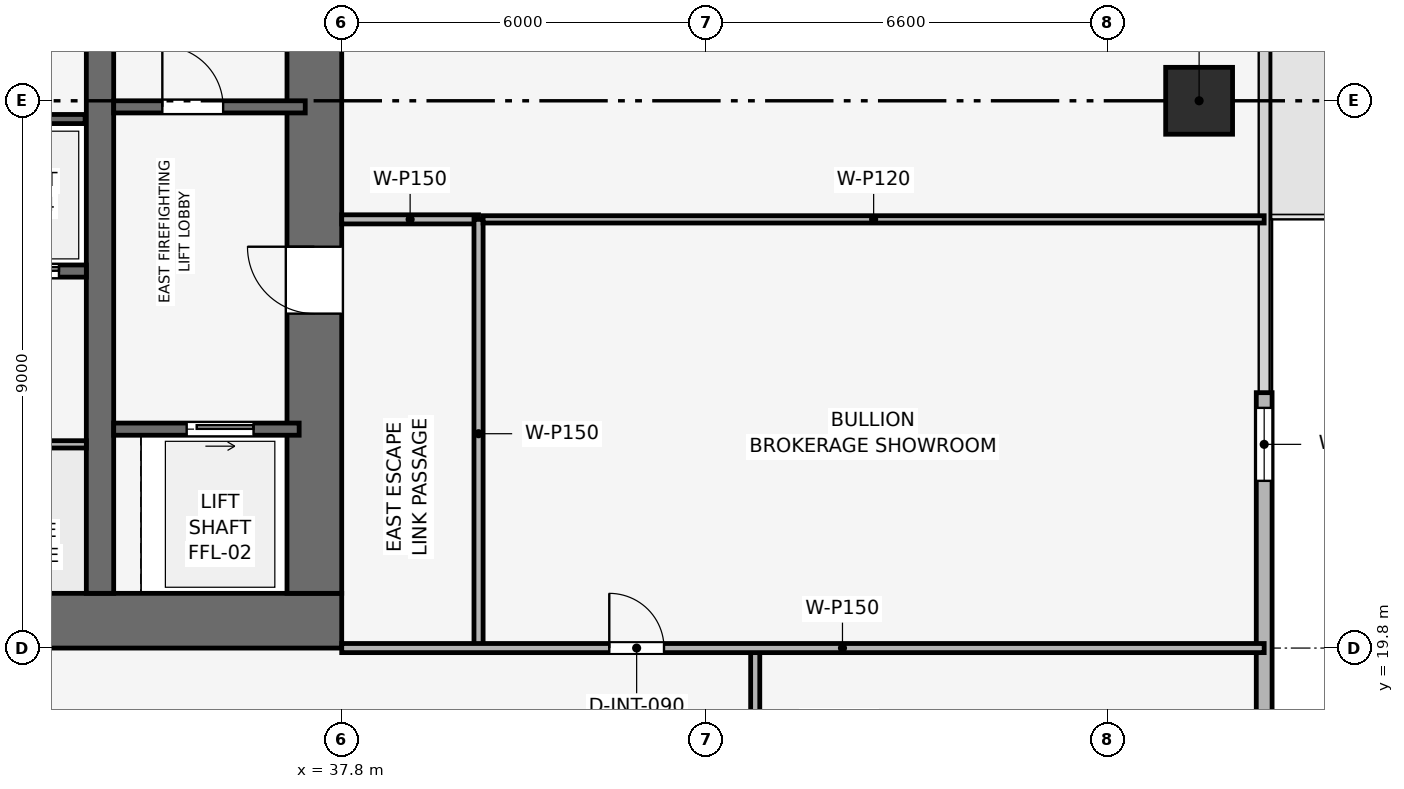
"""IFC4 building model, lengths in metres.
Left out: names, types, materials, properties, quantities, classifications, styles, units other than length and angle.
Written with IfcOpenShell. Run it as: python <this file> out.ifc"""

import sys

from ifc_helpers import new_model, si_unit, direction, frame, frame_2d, origin, origin_2d, place, context, subcontext, project, spatial, rectangle, extrude, element, fill, save


model = new_model("IFC4")
c1 = context("Model", 3, precision=1e-05, world=origin(), true_north=direction((0.0, 1.0)))
c2 = subcontext(c1, "Body", "Model", "MODEL_VIEW")
j1 = project(units=[si_unit("LENGTHUNIT", "METRE"), si_unit("PLANEANGLEUNIT", "RADIAN")], contexts=[c1])
p1 = place(None, origin())
s1 = spatial("IfcSite", under=j1, at=p1, CompositionType="ELEMENT")
p2 = place(p1, origin())
s2 = spatial("IfcBuilding", under=s1, at=p2, CompositionType="ELEMENT")
p3 = place(p2, frame((0.0, 0.0, 164.55)))
s3 = spatial("IfcBuildingStorey", under=s2, at=p3, CompositionType="ELEMENT", Elevation=164.55)
p4 = place(p3, frame((19.8, 20.25, 0.0), z_axis=(0.0, 0.0, 1.0), x_axis=(1.0, 0.0, 0.0)))
e1 = element("IfcWall", 1, at=p4, inside=s3, PredefinedType="SHEAR", context=c2, shape_type="SweptSolid", body=[
    extrude(rectangle(XDim=18.0, YDim=0.9, at=frame_2d((9.0, 0.0))), origin(), (0.0, 0.0, 1.0), 3.75),
])
p5 = place(p4, frame((8.4, 0.0, 0.0)))
e2 = element("IfcOpeningElement", 2, at=p5, cuts=e1, PredefinedType="OPENING", context=c2, shape_type="SweptSolid", body=[
    extrude(rectangle(XDim=1.2, YDim=2.2, at=frame_2d((0.6, 1.1))), frame((0.0, 0.46, 0.0), z_axis=(0.0, -1.0, 0.0), x_axis=(1.0, 0.0, 0.0)), (0.0, 0.0, 1.0), 0.92),
])
p6 = place(p3, frame((37.35, 20.7, 0.0), z_axis=(0.0, 0.0, 1.0), x_axis=(0.0, 1.0, 0.0)))
e3 = element("IfcWall", 3, at=p6, inside=s3, PredefinedType="SHEAR", context=c2, shape_type="SweptSolid", body=[
    extrude(rectangle(XDim=16.2, YDim=0.9, at=frame_2d((8.1, 0.0))), origin(), (0.0, 0.0, 1.0), 3.75),
])
p7 = place(p6, frame((4.6, 0.0, 0.0)))
e4 = element("IfcOpeningElement", 4, at=p7, cuts=e3, PredefinedType="OPENING", context=c2, shape_type="SweptSolid", body=[
    extrude(rectangle(XDim=1.1, YDim=2.15, at=frame_2d((0.55, 1.075))), frame((0.0, 0.46, 0.0), z_axis=(0.0, -1.0, 0.0), x_axis=(1.0, 0.0, 0.0)), (0.0, 0.0, 1.0), 0.92),
])
p8 = place(p3, frame((33.825, 20.7, 0.0), z_axis=(0.0, 0.0, 1.0), x_axis=(0.0, 1.0, 0.0)))
e5 = element("IfcWall", 5, at=p8, inside=s3, PredefinedType="SHEAR", context=c2, shape_type="SweptSolid", body=[
    extrude(rectangle(XDim=16.2, YDim=0.45, at=frame_2d((8.1, 0.0))), origin(), (0.0, 0.0, 1.0), 3.75),
])
p9 = place(p3, frame((51.9, 28.8, 0.003), z_axis=(0.0, 0.0, 1.0), x_axis=(1.0, 0.0, 0.0)))
e6 = element("IfcColumn", 6, at=p9, inside=s3, PredefinedType="COLUMN", context=c2, shape_type="SweptSolid", body=[
    extrude(rectangle(XDim=1.1, YDim=1.1, at=origin_2d()), origin(), (0.0, 0.0, 1.0), 3.489),
])
p10 = place(p3, frame((52.97, 24.0, 0.0), z_axis=(0.0, 0.0, 1.0), x_axis=(0.0, -1.0, 0.0)))
e7 = element("IfcWall", 7, at=p10, inside=s3, PredefinedType="SOLIDWALL", context=c2, shape_type="SweptSolid", body=[
    extrude(rectangle(XDim=12.6, YDim=0.26, at=frame_2d((6.3, 0.0))), origin(), (0.0, 0.0, 1.0), 3.495),
])
p11 = place(p10, frame((0.25, 0.0, 0.9)))
e8 = element("IfcOpeningElement", 8, at=p11, cuts=e7, PredefinedType="OPENING", context=c2, shape_type="SweptSolid", body=[
    extrude(rectangle(XDim=1.2, YDim=2.1, at=frame_2d((0.6, 1.05))), frame((0.0, 0.14, 0.0), z_axis=(0.0, -1.0, 0.0), x_axis=(1.0, 0.0, 0.0)), (0.0, 0.0, 1.0), 0.28),
])
p12 = place(p3, frame((34.05, 28.7, 0.0), z_axis=(0.0, 0.0, 1.0), x_axis=(1.0, 0.0, 0.0)))
e9 = element("IfcWall", 9, at=p12, inside=s3, PredefinedType="SHEAR", context=c2, shape_type="SweptSolid", body=[
    extrude(rectangle(XDim=3.15, YDim=0.2, at=frame_2d((1.575, 0.0))), origin(), (0.0, 0.0, 1.0), 3.495),
])
p13 = place(p12, frame((0.8, 0.0, 0.0)))
e10 = element("IfcOpeningElement", 10, at=p13, cuts=e9, PredefinedType="OPENING", context=c2, shape_type="SweptSolid", body=[
    extrude(rectangle(XDim=1.0, YDim=2.1, at=frame_2d((0.5, 1.05))), frame((0.0, 0.11, 0.0), z_axis=(0.0, -1.0, 0.0), x_axis=(1.0, 0.0, 0.0)), (0.0, 0.0, 1.0), 0.22),
])
p14 = place(p3, frame((34.05, 23.4, 0.0), z_axis=(0.0, 0.0, 1.0), x_axis=(1.0, 0.0, 0.0)))
e11 = element("IfcWall", 11, at=p14, inside=s3, PredefinedType="SHEAR", context=c2, shape_type="SweptSolid", body=[
    extrude(rectangle(XDim=3.05, YDim=0.2, at=frame_2d((1.525, 0.0))), origin(), (0.0, 0.0, 1.0), 3.495),
])
p15 = place(p14, frame((1.2, 0.0, 0.0)))
e12 = element("IfcOpeningElement", 12, at=p15, cuts=e11, PredefinedType="OPENING", context=c2, shape_type="SweptSolid", body=[
    extrude(rectangle(XDim=1.1, YDim=2.15, at=frame_2d((0.55, 1.075))), frame((0.0, 0.11, 0.0), z_axis=(0.0, -1.0, 0.0), x_axis=(1.0, 0.0, 0.0)), (0.0, 0.0, 1.0), 0.22),
])
p16 = place(p3, frame((31.6, 26.0, 0.0), z_axis=(0.0, 0.0, 1.0), x_axis=(1.0, 0.0, 0.0)))
e13 = element("IfcWall", 13, at=p16, inside=s3, PredefinedType="SHEAR", context=c2, shape_type="SweptSolid", body=[
    extrude(rectangle(XDim=2.0, YDim=0.2, at=frame_2d((1.0, 0.0))), origin(), (0.0, 0.0, 1.0), 3.495),
])
p17 = place(p16, frame((0.45, 0.0, 0.0)))
e14 = element("IfcOpeningElement", 14, at=p17, cuts=e13, PredefinedType="OPENING", context=c2, shape_type="SweptSolid", body=[
    extrude(rectangle(XDim=1.1, YDim=2.15, at=frame_2d((0.55, 1.075))), frame((0.0, 0.11, 0.0), z_axis=(0.0, -1.0, 0.0), x_axis=(1.0, 0.0, 0.0)), (0.0, 0.0, 1.0), 0.22),
])
p18 = place(p3, frame((29.5, 28.5, 0.0), z_axis=(0.0, 0.0, 1.0), x_axis=(1.0, 0.0, 0.0)))
e15 = element("IfcWall", 15, at=p18, inside=s3, PredefinedType="SHEAR", context=c2, shape_type="SweptSolid", body=[
    extrude(rectangle(XDim=4.08, YDim=0.15, at=frame_2d((2.04, 0.0))), origin(), (0.0, 0.0, 1.0), 3.495),
])
p19 = place(p3, frame((29.55, 23.15, 0.0), z_axis=(0.0, 0.0, 1.0), x_axis=(1.0, 0.0, 0.0)))
e16 = element("IfcWall", 16, at=p19, inside=s3, PredefinedType="PARTITIONING", context=c2, shape_type="SweptSolid", body=[
    extrude(rectangle(XDim=4.05, YDim=0.12, at=frame_2d((2.025, 0.0))), origin(), (0.0, 0.0, 1.0), 3.495),
])
p20 = place(p19, frame((1.575, 0.0, 0.0)))
e17 = element("IfcOpeningElement", 17, at=p20, cuts=e16, PredefinedType="OPENING", context=c2, shape_type="SweptSolid", body=[
    extrude(rectangle(XDim=0.9, YDim=2.1, at=frame_2d((0.45, 1.05))), frame((0.0, 0.07, 0.0), z_axis=(0.0, -1.0, 0.0), x_axis=(1.0, 0.0, 0.0)), (0.0, 0.0, 1.0), 0.14),
])
p21 = place(p3, frame((37.8, 26.85, 0.0), z_axis=(0.0, 0.0, 1.0), x_axis=(1.0, 0.0, 0.0)))
e18 = element("IfcWall", 18, at=p21, inside=s3, PredefinedType="PARTITIONING", context=c2, shape_type="SweptSolid", body=[
    extrude(rectangle(XDim=2.25, YDim=0.15, at=frame_2d((1.125, 0.0))), origin(), (0.0, 0.0, 1.0), 3.495),
])
p22 = place(p3, frame((40.05, 19.8, 0.0), z_axis=(0.0, 0.0, 1.0), x_axis=(0.0, 1.0, 0.0)))
e19 = element("IfcWall", 19, at=p22, inside=s3, PredefinedType="PARTITIONING", context=c2, shape_type="SweptSolid", body=[
    extrude(rectangle(XDim=7.05, YDim=0.15, at=frame_2d((3.525, 0.0))), origin(), (0.0, 0.0, 1.0), 3.03),
])
p23 = place(p3, frame((40.125, 26.85, 0.0), z_axis=(0.0, 0.0, 1.0), x_axis=(1.0, 0.0, 0.0)))
e20 = element("IfcWall", 20, at=p23, inside=s3, PredefinedType="PARTITIONING", context=c2, shape_type="SweptSolid", body=[
    extrude(rectangle(XDim=12.845, YDim=0.12, at=frame_2d((6.422, 0.0))), origin(), (0.0, 0.0, 1.0), 2.98),
])
p24 = place(p3, frame((44.6, 17.4, 0.0), z_axis=(0.0, 0.0, 1.0), x_axis=(0.0, 1.0, 0.0)))
e21 = element("IfcWall", 21, at=p24, inside=s3, PredefinedType="PARTITIONING", context=c2, shape_type="SweptSolid", body=[
    extrude(rectangle(XDim=2.4, YDim=0.15, at=frame_2d((1.2, 0.0))), origin(), (0.0, 0.0, 1.0), 3.495),
])
p25 = place(p3, frame((37.8, 19.8, 0.0), z_axis=(0.0, 0.0, 1.0), x_axis=(1.0, 0.0, 0.0)))
e22 = element("IfcWall", 22, at=p25, inside=s3, PredefinedType="PARTITIONING", context=c2, shape_type="SweptSolid", body=[
    extrude(rectangle(XDim=15.17, YDim=0.15, at=frame_2d((7.585, 0.0))), origin(), (0.0, 0.0, 1.0), 2.98),
])
p26 = place(p25, frame((4.4, 0.0, 0.0)))
e23 = element("IfcOpeningElement", 23, at=p26, cuts=e22, PredefinedType="OPENING", context=c2, shape_type="SweptSolid", body=[
    extrude(rectangle(XDim=0.9, YDim=2.1, at=frame_2d((0.45, 1.05))), frame((0.0, 0.085, 0.0), z_axis=(0.0, -1.0, 0.0), x_axis=(1.0, 0.0, 0.0)), (0.0, 0.0, 1.0), 0.17),
])
p27 = place(p11, origin())
e24 = element("IfcWindow", 24, at=p27, inside=s3, PartitioningType="SINGLE_PANEL", PredefinedType="WINDOW", context=c2, shape_type="SweptSolid", body=[
    extrude(rectangle(XDim=1.2, YDim=2.1, at=frame_2d((0.6, 1.05))), frame((0.0, 0.03, 0.0), z_axis=(0.0, -1.0, 0.0), x_axis=(1.0, 0.0, 0.0)), (0.0, 0.0, 1.0), 0.06),
])
fill(e8, e24)
p28 = place(p13, origin())
e25 = element("IfcDoor", 25, at=p28, inside=s3, OperationType="SINGLE_SWING_LEFT", PredefinedType="DOOR", context=c2, shape_type="SweptSolid", body=[
    extrude(rectangle(XDim=1.0, YDim=2.1, at=frame_2d((0.5, 1.05))), frame((0.0, 0.025, 0.0), z_axis=(0.0, -1.0, 0.0), x_axis=(1.0, 0.0, 0.0)), (0.0, 0.0, 1.0), 0.05),
])
fill(e10, e25)
p29 = place(p15, origin())
e26 = element("IfcDoor", 26, at=p29, inside=s3, OperationType="SLIDING_TO_RIGHT", PredefinedType="DOOR", context=c2, shape_type="SweptSolid", body=[
    extrude(rectangle(XDim=1.1, YDim=2.15, at=frame_2d((0.55, 1.075))), frame((0.0, 0.025, 0.0), z_axis=(0.0, -1.0, 0.0), x_axis=(1.0, 0.0, 0.0)), (0.0, 0.0, 1.0), 0.05),
])
fill(e12, e26)
p30 = place(p17, origin())
e27 = element("IfcDoor", 27, at=p30, inside=s3, OperationType="SLIDING_TO_RIGHT", PredefinedType="DOOR", context=c2, shape_type="SweptSolid", body=[
    extrude(rectangle(XDim=1.1, YDim=2.15, at=frame_2d((0.55, 1.075))), frame((0.0, 0.025, 0.0), z_axis=(0.0, -1.0, 0.0), x_axis=(1.0, 0.0, 0.0)), (0.0, 0.0, 1.0), 0.05),
])
fill(e14, e27)
p31 = place(p26, origin())
e28 = element("IfcDoor", 28, at=p31, inside=s3, OperationType="SINGLE_SWING_LEFT", PredefinedType="DOOR", context=c2, shape_type="SweptSolid", body=[
    extrude(rectangle(XDim=0.9, YDim=2.1, at=frame_2d((0.45, 1.05))), frame((0.0, 0.025, 0.0), z_axis=(0.0, -1.0, 0.0), x_axis=(1.0, 0.0, 0.0)), (0.0, 0.0, 1.0), 0.05),
])
fill(e23, e28)
p32 = place(p7, origin())
e29 = element("IfcDoor", 29, at=p32, inside=s3, OperationType="SINGLE_SWING_RIGHT", PredefinedType="DOOR", context=c2, shape_type="SweptSolid", body=[
    extrude(rectangle(XDim=1.1, YDim=2.15, at=frame_2d((0.55, 1.075))), frame((0.0, 0.025, 0.0), z_axis=(0.0, -1.0, 0.0), x_axis=(1.0, 0.0, 0.0)), (0.0, 0.0, 1.0), 0.05),
])
fill(e4, e29)
save(model, sys.argv[1])
